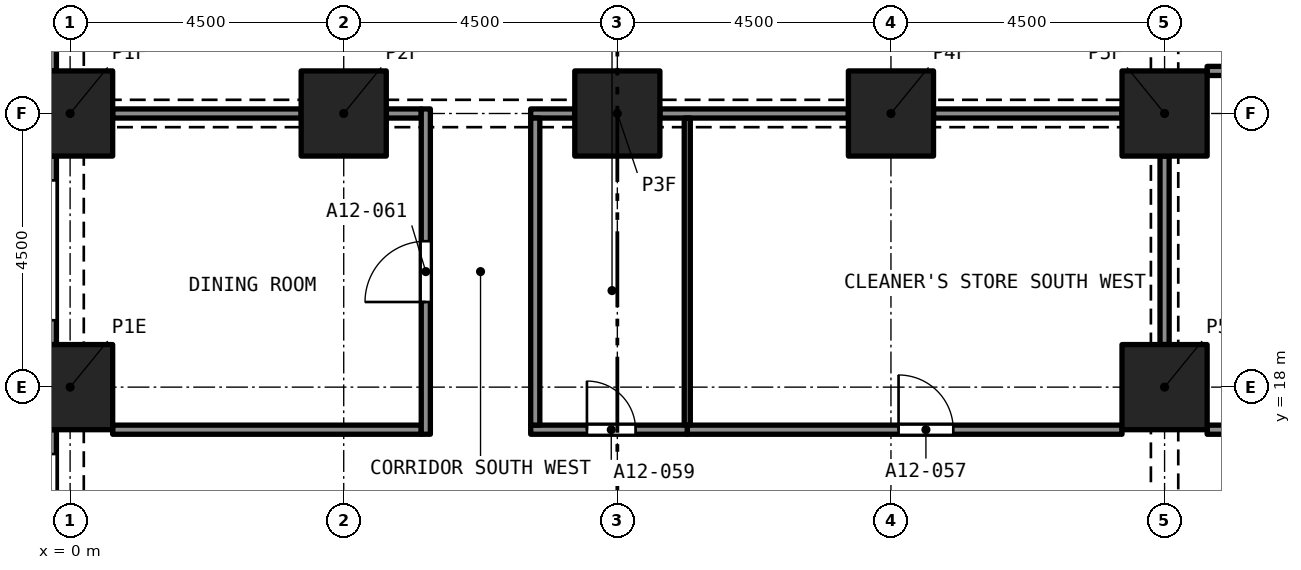
"""IFC4 building model, lengths in metres.
Left out: names, types, materials, properties, quantities, classifications, styles, units other than length and angle.
Written with IfcOpenShell. Run it as: python <this file> out.ifc"""

import sys

from ifc_helpers import new_model, si_unit, direction, frame, frame_2d, origin, origin_2d, place, context, subcontext, project, spatial, rectangle, extrude, element, fill, save


model = new_model("IFC4")
c1 = context("Model", 3, precision=1e-05, world=origin(), true_north=direction((0.0, 1.0)))
c2 = subcontext(c1, "Body", "Model", "MODEL_VIEW")
j1 = project(units=[si_unit("LENGTHUNIT", "METRE"), si_unit("PLANEANGLEUNIT", "RADIAN")], contexts=[c1])
p1 = place(None, origin())
s1 = spatial("IfcSite", under=j1, at=p1, CompositionType="ELEMENT")
p2 = place(p1, origin())
s2 = spatial("IfcBuilding", under=s1, at=p2, CompositionType="ELEMENT")
p3 = place(p2, frame((0.0, 0.0, 49.6)))
s3 = spatial("IfcBuildingStorey", under=s2, at=p3, CompositionType="ELEMENT", Elevation=49.6)
for number, where, z_axis, x_axis in (
    (1, (0.0, 18.0, 0.0), (0.0, 0.0, 1.0), (1.0, 0.0, 0.0)),
    (2, (18.0, 18.0, 0.0), (0.0, 0.0, 1.0), (1.0, 0.0, 0.0)),
    (3, (0.0, 22.5, 0.0), (0.0, 0.0, 1.0), (1.0, 0.0, 0.0)),
    (4, (4.5, 22.5, 0.0), (0.0, 0.0, 1.0), (1.0, 0.0, 0.0)),
    (5, (9.0, 22.5, 0.0), (0.0, 0.0, 1.0), (1.0, 0.0, 0.0)),
    (6, (13.5, 22.5, 0.0), (0.0, 0.0, 1.0), (1.0, 0.0, 0.0)),
    (7, (18.0, 22.5, 0.0), (0.0, 0.0, 1.0), (1.0, 0.0, 0.0)),
):
    element("IfcColumn", number, at=place(p3, frame(where, z_axis=z_axis, x_axis=x_axis)), inside=s3, PredefinedType="COLUMN", context=c2, shape_type="SweptSolid", body=[
        extrude(rectangle(XDim=1.4, YDim=1.4, at=origin_2d()), origin(), (0.0, 0.0, 1.0), 3.2),
    ])
p4 = place(p3, frame((-0.375, 23.2, 0.0), z_axis=(0.0, 0.0, 1.0), x_axis=(0.0, 1.0, 0.0)))
e8 = element("IfcWall", 8, at=p4, inside=s3, PredefinedType="SOLIDWALL", context=c2, shape_type="SweptSolid", body=[
    extrude(rectangle(XDim=3.1, YDim=0.3, at=frame_2d((1.55, 0.0))), origin(), (0.0, 0.0, 1.0), 3.2),
])
p5 = place(p4, frame((0.4, 0.0, 0.45)))
e9 = element("IfcOpeningElement", 9, at=p5, cuts=e8, PredefinedType="OPENING", context=c2, shape_type="SweptSolid", body=[
    extrude(rectangle(XDim=2.3, YDim=1.95, at=frame_2d((1.15, 0.975))), frame((0.0, 0.16, 0.0), z_axis=(0.0, -1.0, 0.0), x_axis=(1.0, 0.0, 0.0)), (0.0, 0.0, 1.0), 0.32),
])
p6 = place(p3, frame((-0.375, 18.7, 0.0), z_axis=(0.0, 0.0, 1.0), x_axis=(0.0, 1.0, 0.0)))
e10 = element("IfcWall", 10, at=p6, inside=s3, PredefinedType="SOLIDWALL", context=c2, shape_type="SweptSolid", body=[
    extrude(rectangle(XDim=3.1, YDim=0.3, at=frame_2d((1.55, 0.0))), origin(), (0.0, 0.0, 1.0), 3.2),
])
p7 = place(p6, frame((0.4, 0.0, 0.45)))
e11 = element("IfcOpeningElement", 11, at=p7, cuts=e10, PredefinedType="OPENING", context=c2, shape_type="SweptSolid", body=[
    extrude(rectangle(XDim=2.3, YDim=1.95, at=frame_2d((1.15, 0.975))), frame((0.0, 0.16, 0.0), z_axis=(0.0, -1.0, 0.0), x_axis=(1.0, 0.0, 0.0)), (0.0, 0.0, 1.0), 0.32),
])
p8 = place(p3, frame((-0.375, 14.2, 0.0), z_axis=(0.0, 0.0, 1.0), x_axis=(0.0, 1.0, 0.0)))
e12 = element("IfcWall", 12, at=p8, inside=s3, PredefinedType="SOLIDWALL", context=c2, shape_type="SweptSolid", body=[
    extrude(rectangle(XDim=3.1, YDim=0.3, at=frame_2d((1.55, 0.0))), origin(), (0.0, 0.0, 1.0), 3.2),
])
p9 = place(p8, frame((0.4, 0.0, 0.45)))
e13 = element("IfcOpeningElement", 13, at=p9, cuts=e12, PredefinedType="OPENING", context=c2, shape_type="SweptSolid", body=[
    extrude(rectangle(XDim=2.3, YDim=1.95, at=frame_2d((1.15, 0.975))), frame((0.0, 0.16, 0.0), z_axis=(0.0, -1.0, 0.0), x_axis=(1.0, 0.0, 0.0)), (0.0, 0.0, 1.0), 0.32),
])
p10 = place(p3, frame((18.7, 17.3, 0.0), z_axis=(0.0, 0.0, 1.0), x_axis=(1.0, 0.0, 0.0)))
e14 = element("IfcWall", 14, at=p10, inside=s3, PredefinedType="PARTITIONING", context=c2, shape_type="SweptSolid", body=[
    extrude(rectangle(XDim=5.075, YDim=0.15, at=frame_2d((2.538, 0.0))), origin(), (0.0, 0.0, 1.0), 2.75),
])
p11 = place(p3, frame((10.15, 17.3, 0.0), z_axis=(0.0, 0.0, 1.0), x_axis=(1.0, 0.0, 0.0)))
e15 = element("IfcWall", 15, at=p11, inside=s3, PredefinedType="PARTITIONING", context=c2, shape_type="SweptSolid", body=[
    extrude(rectangle(XDim=7.15, YDim=0.15, at=frame_2d((3.575, 0.0))), origin(), (0.0, 0.0, 1.0), 2.9),
])
p12 = place(p11, frame((3.475, 0.0, 0.0)))
e16 = element("IfcOpeningElement", 16, at=p12, cuts=e15, PredefinedType="OPENING", context=c2, shape_type="SweptSolid", body=[
    extrude(rectangle(XDim=0.9, YDim=2.1, at=frame_2d((0.45, 1.05))), frame((0.0, 0.085, 0.0), z_axis=(0.0, -1.0, 0.0), x_axis=(1.0, 0.0, 0.0)), (0.0, 0.0, 1.0), 0.17),
])
p13 = place(p3, frame((7.575, 17.3, 0.0), z_axis=(0.0, 0.0, 1.0), x_axis=(1.0, 0.0, 0.0)))
e17 = element("IfcWall", 17, at=p13, inside=s3, PredefinedType="PARTITIONING", context=c2, shape_type="SweptSolid", body=[
    extrude(rectangle(XDim=2.575, YDim=0.15, at=frame_2d((1.288, 0.0))), origin(), (0.0, 0.0, 1.0), 2.9),
])
p14 = place(p13, frame((0.925, 0.0, 0.0)))
e18 = element("IfcOpeningElement", 18, at=p14, cuts=e17, PredefinedType="OPENING", context=c2, shape_type="SweptSolid", body=[
    extrude(rectangle(XDim=0.8, YDim=2.1, at=frame_2d((0.4, 1.05))), frame((0.0, 0.085, 0.0), z_axis=(0.0, -1.0, 0.0), x_axis=(1.0, 0.0, 0.0)), (0.0, 0.0, 1.0), 0.17),
])
p15 = place(p3, frame((0.7, 17.3, 0.0), z_axis=(0.0, 0.0, 1.0), x_axis=(1.0, 0.0, 0.0)))
e19 = element("IfcWall", 19, at=p15, inside=s3, PredefinedType="PARTITIONING", context=c2, shape_type="SweptSolid", body=[
    extrude(rectangle(XDim=5.075, YDim=0.15, at=frame_2d((2.538, 0.0))), origin(), (0.0, 0.0, 1.0), 2.9),
])
p16 = place(p3, frame((18.7, 23.2, 0.0), z_axis=(0.0, 0.0, 1.0), x_axis=(1.0, 0.0, 0.0)))
e20 = element("IfcWall", 20, at=p16, inside=s3, PredefinedType="PARTITIONING", context=c2, shape_type="SweptSolid", body=[
    extrude(rectangle(XDim=5.075, YDim=0.15, at=frame_2d((2.538, 0.0))), origin(), (0.0, 0.0, 1.0), 2.75),
])
for number, where, z_axis, x_axis in (
    (21, (18.0, 18.7, 0.0), (0.0, 0.0, 1.0), (0.0, 1.0, 0.0)),
    (22, (14.2, 22.5, 0.0), (0.0, 0.0, 1.0), (1.0, 0.0, 0.0)),
    (23, (9.7, 22.5, 0.0), (0.0, 0.0, 1.0), (1.0, 0.0, 0.0)),
):
    element("IfcWall", number, at=place(p3, frame(where, z_axis=z_axis, x_axis=x_axis)), inside=s3, PredefinedType="PARTITIONING", context=c2, shape_type="SweptSolid", body=[
        extrude(rectangle(XDim=3.1, YDim=0.15, at=frame_2d((1.55, 0.0))), origin(), (0.0, 0.0, 1.0), 2.38),
    ])
p17 = place(p3, frame((7.575, 22.5, 0.0), z_axis=(0.0, 0.0, 1.0), x_axis=(1.0, 0.0, 0.0)))
e24 = element("IfcWall", 24, at=p17, inside=s3, PredefinedType="PARTITIONING", context=c2, shape_type="SweptSolid", body=[
    extrude(rectangle(XDim=0.725, YDim=0.15, at=frame_2d((0.363, 0.0))), origin(), (0.0, 0.0, 1.0), 2.38),
])
p18 = place(p3, frame((5.2, 22.5, 0.0), z_axis=(0.0, 0.0, 1.0), x_axis=(1.0, 0.0, 0.0)))
e25 = element("IfcWall", 25, at=p18, inside=s3, PredefinedType="PARTITIONING", context=c2, shape_type="SweptSolid", body=[
    extrude(rectangle(XDim=0.575, YDim=0.15, at=frame_2d((0.288, 0.0))), origin(), (0.0, 0.0, 1.0), 2.38),
])
p19 = place(p3, frame((0.7, 22.5, 0.0), z_axis=(0.0, 0.0, 1.0), x_axis=(1.0, 0.0, 0.0)))
e26 = element("IfcWall", 26, at=p19, inside=s3, PredefinedType="PARTITIONING", context=c2, shape_type="SweptSolid", body=[
    extrude(rectangle(XDim=3.1, YDim=0.15, at=frame_2d((1.55, 0.0))), origin(), (0.0, 0.0, 1.0), 2.38),
])
p20 = place(p3, frame((7.65, 17.375, 0.0), z_axis=(0.0, 0.0, 1.0), x_axis=(0.0, 1.0, 0.0)))
e27 = element("IfcWall", 27, at=p20, inside=s3, PredefinedType="PARTITIONING", context=c2, shape_type="SweptSolid", body=[
    extrude(rectangle(XDim=5.05, YDim=0.15, at=frame_2d((2.525, 0.0))), origin(), (0.0, 0.0, 1.0), 2.9),
])
p21 = place(p3, frame((5.85, 17.225, 0.0), z_axis=(0.0, 0.0, 1.0), x_axis=(0.0, 1.0, 0.0)))
e28 = element("IfcWall", 28, at=p21, inside=s3, PredefinedType="PARTITIONING", context=c2, shape_type="SweptSolid", body=[
    extrude(rectangle(XDim=5.35, YDim=0.15, at=frame_2d((2.675, 0.0))), origin(), (0.0, 0.0, 1.0), 2.9),
])
p22 = place(p21, frame((2.175, 0.0, 0.0)))
e29 = element("IfcOpeningElement", 29, at=p22, cuts=e28, PredefinedType="OPENING", context=c2, shape_type="SweptSolid", body=[
    extrude(rectangle(XDim=1.0, YDim=2.1, at=frame_2d((0.5, 1.05))), frame((0.0, 0.085, 0.0), z_axis=(0.0, -1.0, 0.0), x_axis=(1.0, 0.0, 0.0)), (0.0, 0.0, 1.0), 0.17),
])
p23 = place(p3, frame((10.15, 17.375, 0.0), z_axis=(0.0, 0.0, 1.0), x_axis=(0.0, 1.0, 0.0)))
e30 = element("IfcWall", 30, at=p23, inside=s3, PredefinedType="PARTITIONING", context=c2, shape_type="SweptSolid", body=[
    extrude(rectangle(XDim=5.05, YDim=0.1, at=frame_2d((2.525, 0.0))), origin(), (0.0, 0.0, 1.0), 2.9),
])
p24 = place(p12, origin())
e31 = element("IfcDoor", 31, at=p24, inside=s3, OperationType="SINGLE_SWING_RIGHT", PredefinedType="DOOR", context=c2, shape_type="SweptSolid", body=[
    extrude(rectangle(XDim=0.9, YDim=2.1, at=frame_2d((0.45, 1.05))), frame((0.0, 0.025, 0.0), z_axis=(0.0, -1.0, 0.0), x_axis=(1.0, 0.0, 0.0)), (0.0, 0.0, 1.0), 0.05),
])
fill(e16, e31)
p25 = place(p14, origin())
e32 = element("IfcDoor", 32, at=p25, inside=s3, OperationType="SINGLE_SWING_RIGHT", PredefinedType="DOOR", context=c2, shape_type="SweptSolid", body=[
    extrude(rectangle(XDim=0.8, YDim=2.1, at=frame_2d((0.4, 1.05))), frame((0.0, 0.025, 0.0), z_axis=(0.0, -1.0, 0.0), x_axis=(1.0, 0.0, 0.0)), (0.0, 0.0, 1.0), 0.05),
])
fill(e18, e32)
p26 = place(p22, origin())
e33 = element("IfcDoor", 33, at=p26, inside=s3, OperationType="SINGLE_SWING_LEFT", PredefinedType="DOOR", context=c2, shape_type="SweptSolid", body=[
    extrude(rectangle(XDim=1.0, YDim=2.1, at=frame_2d((0.5, 1.05))), frame((0.0, 0.025, 0.0), z_axis=(0.0, -1.0, 0.0), x_axis=(1.0, 0.0, 0.0)), (0.0, 0.0, 1.0), 0.05),
])
fill(e29, e33)
save(model, sys.argv[1])
